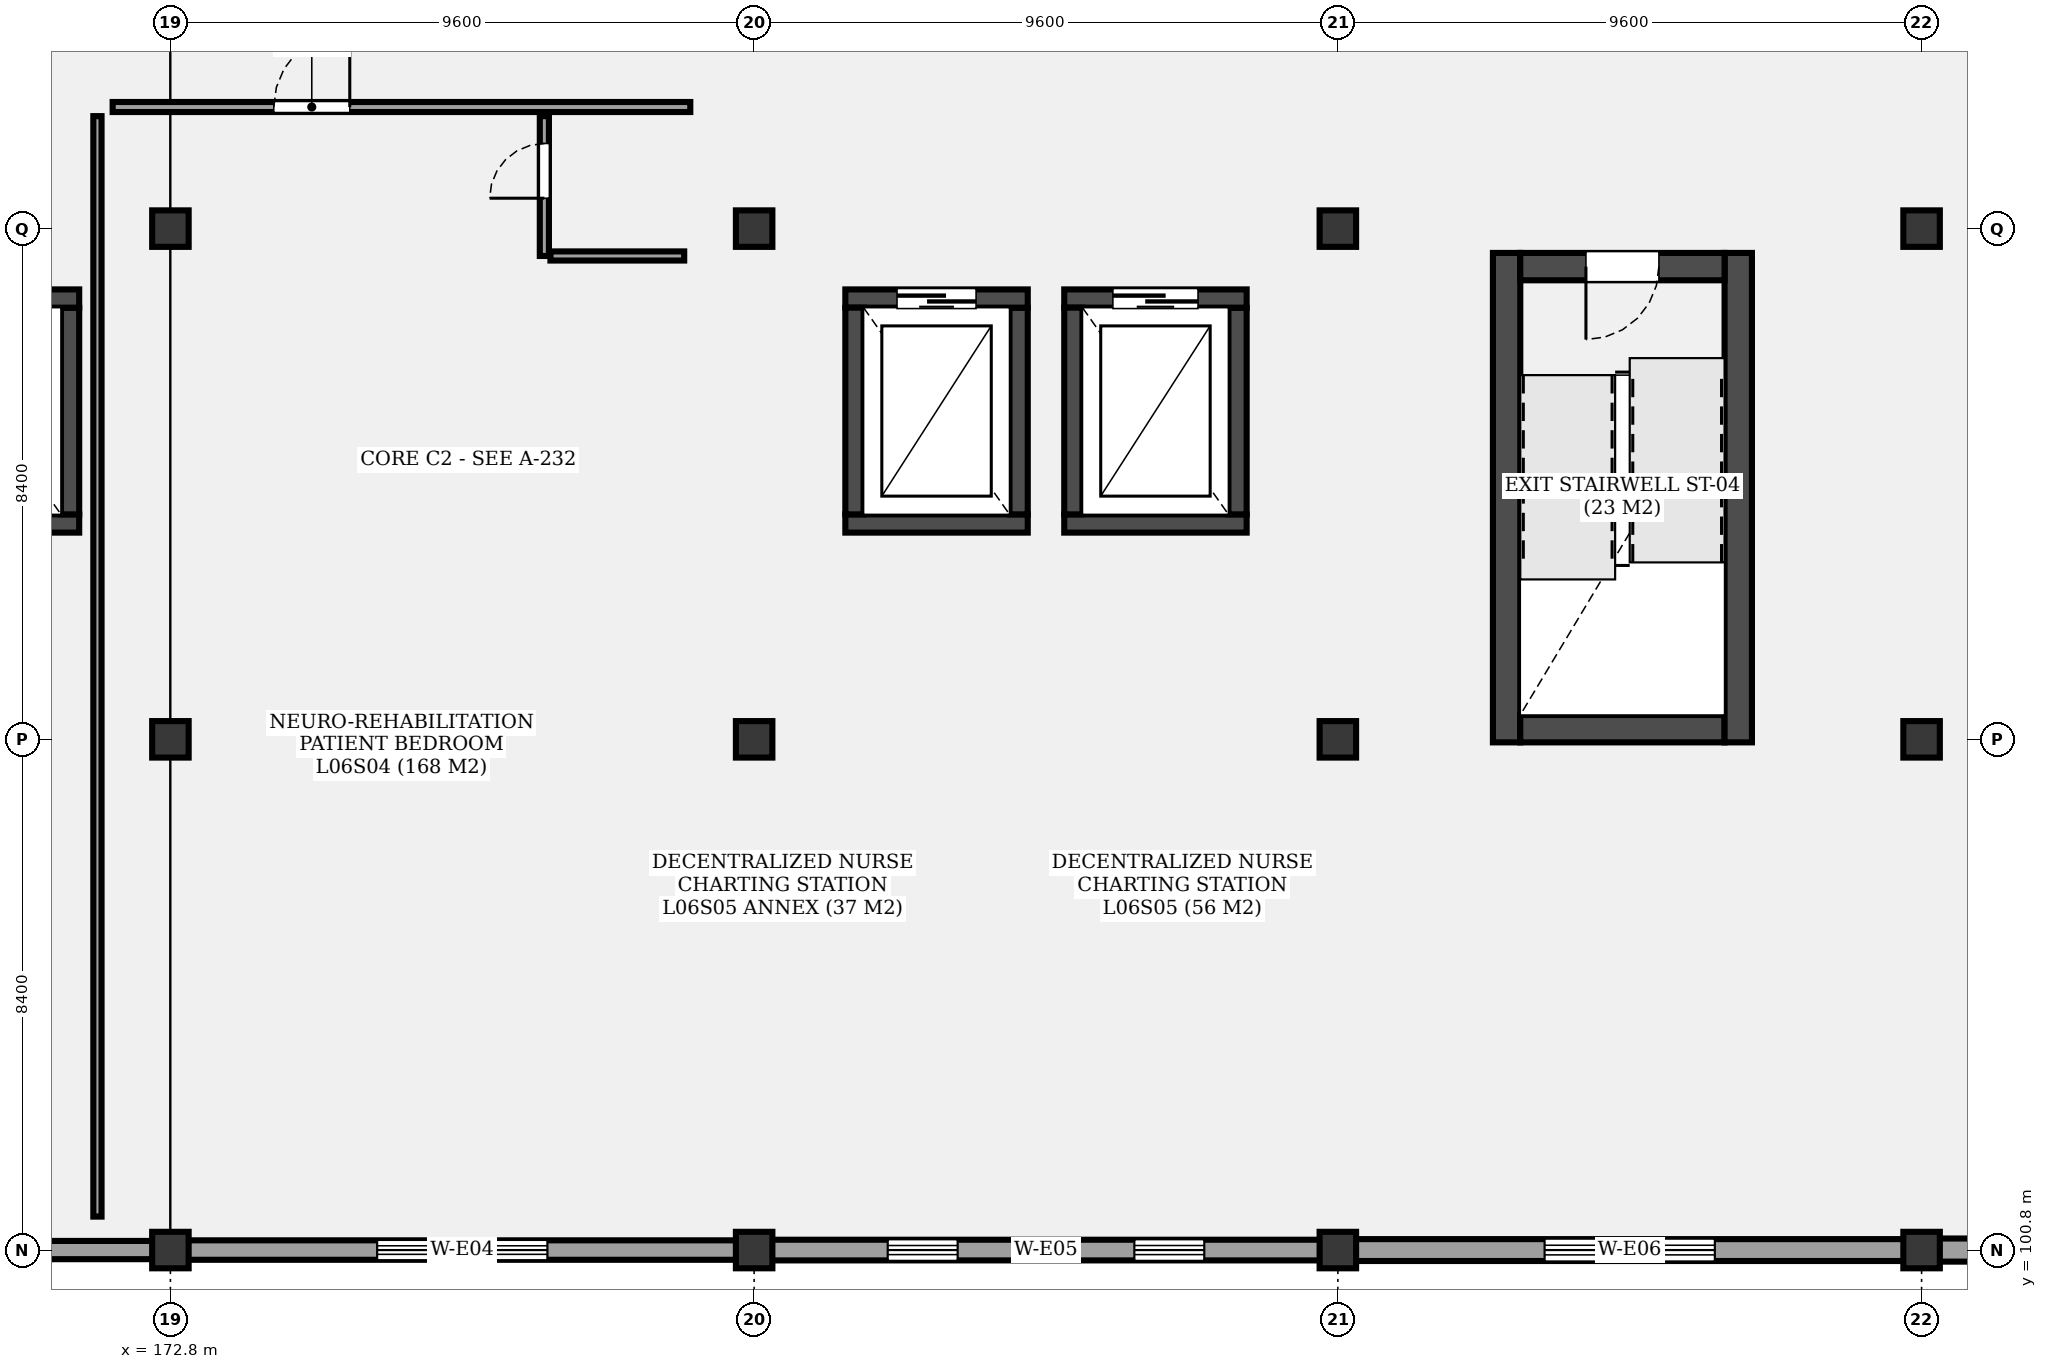
"""IFC4 building model, lengths in metres.
Left out: names, types, materials, properties, quantities, classifications, styles, units other than length and angle.
Written with IfcOpenShell. Run it as: python <this file> out.ifc"""

import sys

from ifc_helpers import new_model, si_unit, direction, frame, frame_2d, origin, origin_2d, place, context, subcontext, project, spatial, rectangle, extrude, element, fill, save


model = new_model("IFC4")
c1 = context("Model", 3, precision=1e-05, world=origin(), true_north=direction((0.0, 1.0)))
c2 = subcontext(c1, "Body", "Model", "MODEL_VIEW")
j1 = project(units=[si_unit("LENGTHUNIT", "METRE"), si_unit("PLANEANGLEUNIT", "RADIAN")], contexts=[c1])
p1 = place(None, origin())
s1 = spatial("IfcSite", under=j1, at=p1, CompositionType="ELEMENT")
p2 = place(p1, origin())
s2 = spatial("IfcBuilding", under=s1, at=p2, CompositionType="ELEMENT")
p3 = place(p2, frame((0.0, 0.0, 26.2)))
s3 = spatial("IfcBuildingStorey", under=s2, at=p3, CompositionType="ELEMENT", Elevation=26.2)
for number, where, z_axis, x_axis in (
    (1, (172.8, 100.8, 0.0), (0.0, 0.0, 1.0), (1.0, 0.0, 0.0)),
    (2, (172.8, 109.2, 0.0), (0.0, 0.0, 1.0), (1.0, 0.0, 0.0)),
    (3, (172.8, 117.6, 0.0), (0.0, 0.0, 1.0), (1.0, 0.0, 0.0)),
    (4, (182.4, 100.8, 0.0), (0.0, 0.0, 1.0), (1.0, 0.0, 0.0)),
    (5, (182.4, 109.2, 0.0), (0.0, 0.0, 1.0), (1.0, 0.0, 0.0)),
    (6, (182.4, 117.6, 0.0), (0.0, 0.0, 1.0), (1.0, 0.0, 0.0)),
    (7, (192.0, 100.8, 0.0), (0.0, 0.0, 1.0), (1.0, 0.0, 0.0)),
    (8, (192.0, 109.2, 0.0), (0.0, 0.0, 1.0), (1.0, 0.0, 0.0)),
    (9, (192.0, 117.6, 0.0), (0.0, 0.0, 1.0), (1.0, 0.0, 0.0)),
    (10, (201.6, 100.8, 0.0), (0.0, 0.0, 1.0), (1.0, 0.0, 0.0)),
    (11, (201.6, 109.2, 0.0), (0.0, 0.0, 1.0), (1.0, 0.0, 0.0)),
    (12, (201.6, 117.6, 0.0), (0.0, 0.0, 1.0), (1.0, 0.0, 0.0)),
):
    element("IfcColumn", number, at=place(p3, frame(where, z_axis=z_axis, x_axis=x_axis)), inside=s3, PredefinedType="COLUMN", context=c2, shape_type="SweptSolid", body=[
        extrude(rectangle(XDim=0.6, YDim=0.6, at=origin_2d()), origin(), (0.0, 0.0, 1.0), 4.2),
    ])
p4 = place(p3, frame((194.775, 117.2, 0.0), z_axis=(0.0, 0.0, 1.0), x_axis=(0.0, -1.0, 0.0)))
e13 = element("IfcWall", 13, at=p4, inside=s3, PredefinedType="SHEAR", context=c2, shape_type="SweptSolid", body=[
    extrude(rectangle(XDim=8.05, YDim=0.45, at=frame_2d((4.025, 0.0))), origin(), (0.0, 0.0, 1.0), 4.2),
])
p5 = place(p3, frame((195.0, 109.375, 0.0), z_axis=(0.0, 0.0, 1.0), x_axis=(1.0, 0.0, 0.0)))
e14 = element("IfcWall", 14, at=p5, inside=s3, PredefinedType="SHEAR", context=c2, shape_type="SweptSolid", body=[
    extrude(rectangle(XDim=3.36, YDim=0.45, at=frame_2d((1.68, 0.0))), origin(), (0.0, 0.0, 1.0), 4.2),
])
p6 = place(p3, frame((198.585, 109.15, 0.0), z_axis=(0.0, 0.0, 1.0), x_axis=(0.0, 1.0, 0.0)))
e15 = element("IfcWall", 15, at=p6, inside=s3, PredefinedType="SHEAR", context=c2, shape_type="SweptSolid", body=[
    extrude(rectangle(XDim=8.05, YDim=0.45, at=frame_2d((4.025, 0.0))), origin(), (0.0, 0.0, 1.0), 4.2),
])
p7 = place(p3, frame((198.36, 116.975, 0.0), z_axis=(0.0, 0.0, 1.0), x_axis=(-1.0, 0.0, 0.0)))
e16 = element("IfcWall", 16, at=p7, inside=s3, PredefinedType="SHEAR", context=c2, shape_type="SweptSolid", body=[
    extrude(rectangle(XDim=3.36, YDim=0.45, at=frame_2d((1.68, 0.0))), origin(), (0.0, 0.0, 1.0), 4.2),
])
p8 = place(p7, frame((1.08, 0.0, 0.0)))
e17 = element("IfcOpeningElement", 17, at=p8, cuts=e16, PredefinedType="OPENING", context=c2, shape_type="SweptSolid", body=[
    extrude(rectangle(XDim=1.2, YDim=2.2, at=frame_2d((0.6, 1.1))), frame((0.0, 0.235, 0.0), z_axis=(0.0, -1.0, 0.0), x_axis=(1.0, 0.0, 0.0)), (0.0, 0.0, 1.0), 0.47),
])
p9 = place(p3, frame((168.3, 112.75, 0.0), z_axis=(0.0, 0.0, 1.0), x_axis=(1.0, 0.0, 0.0)))
e18 = element("IfcWall", 18, at=p9, inside=s3, PredefinedType="SHEAR", context=c2, shape_type="SweptSolid", body=[
    extrude(rectangle(XDim=3.0, YDim=0.3, at=frame_2d((1.5, 0.0))), origin(), (0.0, 0.0, 1.0), 4.2),
])
p10 = place(p3, frame((171.15, 112.9, 0.0), z_axis=(0.0, 0.0, 1.0), x_axis=(0.0, 1.0, 0.0)))
e19 = element("IfcWall", 19, at=p10, inside=s3, PredefinedType="SHEAR", context=c2, shape_type="SweptSolid", body=[
    extrude(rectangle(XDim=3.4, YDim=0.3, at=frame_2d((1.7, 0.0))), origin(), (0.0, 0.0, 1.0), 4.2),
])
p11 = place(p3, frame((171.3, 116.45, 0.0), z_axis=(0.0, 0.0, 1.0), x_axis=(-1.0, 0.0, 0.0)))
e20 = element("IfcWall", 20, at=p11, inside=s3, PredefinedType="SHEAR", context=c2, shape_type="SweptSolid", body=[
    extrude(rectangle(XDim=3.0, YDim=0.3, at=frame_2d((1.5, 0.0))), origin(), (0.0, 0.0, 1.0), 4.2),
])
p12 = place(p11, frame((0.8, 0.0, 0.0)))
e21 = element("IfcOpeningElement", 21, at=p12, cuts=e20, PredefinedType="OPENING", context=c2, shape_type="SweptSolid", body=[
    extrude(rectangle(XDim=1.4, YDim=2.3, at=frame_2d((0.7, 1.15))), frame((0.0, 0.16, 0.0), z_axis=(0.0, -1.0, 0.0), x_axis=(1.0, 0.0, 0.0)), (0.0, 0.0, 1.0), 0.32),
])
p13 = place(p3, frame((183.9, 112.75, 0.0), z_axis=(0.0, 0.0, 1.0), x_axis=(1.0, 0.0, 0.0)))
e22 = element("IfcWall", 22, at=p13, inside=s3, PredefinedType="SHEAR", context=c2, shape_type="SweptSolid", body=[
    extrude(rectangle(XDim=3.0, YDim=0.3, at=frame_2d((1.5, 0.0))), origin(), (0.0, 0.0, 1.0), 4.2),
])
p14 = place(p3, frame((186.75, 112.9, 0.0), z_axis=(0.0, 0.0, 1.0), x_axis=(0.0, 1.0, 0.0)))
e23 = element("IfcWall", 23, at=p14, inside=s3, PredefinedType="SHEAR", context=c2, shape_type="SweptSolid", body=[
    extrude(rectangle(XDim=3.4, YDim=0.3, at=frame_2d((1.7, 0.0))), origin(), (0.0, 0.0, 1.0), 4.2),
])
p15 = place(p3, frame((186.9, 116.45, 0.0), z_axis=(0.0, 0.0, 1.0), x_axis=(-1.0, 0.0, 0.0)))
e24 = element("IfcWall", 24, at=p15, inside=s3, PredefinedType="SHEAR", context=c2, shape_type="SweptSolid", body=[
    extrude(rectangle(XDim=3.0, YDim=0.3, at=frame_2d((1.5, 0.0))), origin(), (0.0, 0.0, 1.0), 4.2),
])
p16 = place(p15, frame((0.85, 0.0, 0.0)))
e25 = element("IfcOpeningElement", 25, at=p16, cuts=e24, PredefinedType="OPENING", context=c2, shape_type="SweptSolid", body=[
    extrude(rectangle(XDim=1.3, YDim=2.3, at=frame_2d((0.65, 1.15))), frame((0.0, 0.16, 0.0), z_axis=(0.0, -1.0, 0.0), x_axis=(1.0, 0.0, 0.0)), (0.0, 0.0, 1.0), 0.32),
])
p17 = place(p3, frame((184.05, 116.3, 0.0), z_axis=(0.0, 0.0, 1.0), x_axis=(0.0, -1.0, 0.0)))
e26 = element("IfcWall", 26, at=p17, inside=s3, PredefinedType="SHEAR", context=c2, shape_type="SweptSolid", body=[
    extrude(rectangle(XDim=3.4, YDim=0.3, at=frame_2d((1.7, 0.0))), origin(), (0.0, 0.0, 1.0), 4.2),
])
p18 = place(p3, frame((187.5, 112.75, 0.0), z_axis=(0.0, 0.0, 1.0), x_axis=(1.0, 0.0, 0.0)))
e27 = element("IfcWall", 27, at=p18, inside=s3, PredefinedType="SHEAR", context=c2, shape_type="SweptSolid", body=[
    extrude(rectangle(XDim=3.0, YDim=0.3, at=frame_2d((1.5, 0.0))), origin(), (0.0, 0.0, 1.0), 4.2),
])
p19 = place(p3, frame((190.35, 112.9, 0.0), z_axis=(0.0, 0.0, 1.0), x_axis=(0.0, 1.0, 0.0)))
e28 = element("IfcWall", 28, at=p19, inside=s3, PredefinedType="SHEAR", context=c2, shape_type="SweptSolid", body=[
    extrude(rectangle(XDim=3.4, YDim=0.3, at=frame_2d((1.7, 0.0))), origin(), (0.0, 0.0, 1.0), 4.2),
])
p20 = place(p3, frame((190.5, 116.45, 0.0), z_axis=(0.0, 0.0, 1.0), x_axis=(-1.0, 0.0, 0.0)))
e29 = element("IfcWall", 29, at=p20, inside=s3, PredefinedType="SHEAR", context=c2, shape_type="SweptSolid", body=[
    extrude(rectangle(XDim=3.0, YDim=0.3, at=frame_2d((1.5, 0.0))), origin(), (0.0, 0.0, 1.0), 4.2),
])
p21 = place(p20, frame((0.8, 0.0, 0.0)))
e30 = element("IfcOpeningElement", 30, at=p21, cuts=e29, PredefinedType="OPENING", context=c2, shape_type="SweptSolid", body=[
    extrude(rectangle(XDim=1.4, YDim=2.3, at=frame_2d((0.7, 1.15))), frame((0.0, 0.16, 0.0), z_axis=(0.0, -1.0, 0.0), x_axis=(1.0, 0.0, 0.0)), (0.0, 0.0, 1.0), 0.32),
])
p22 = place(p3, frame((187.65, 116.3, 0.0), z_axis=(0.0, 0.0, 1.0), x_axis=(0.0, -1.0, 0.0)))
e31 = element("IfcWall", 31, at=p22, inside=s3, PredefinedType="SHEAR", context=c2, shape_type="SweptSolid", body=[
    extrude(rectangle(XDim=3.4, YDim=0.3, at=frame_2d((1.7, 0.0))), origin(), (0.0, 0.0, 1.0), 4.2),
])
p23 = place(p3, frame((172.8, 100.8, 0.0), z_axis=(0.0, 0.0, 1.0), x_axis=(-1.0, 0.0, 0.0)))
e32 = element("IfcWall", 32, at=p23, inside=s3, PredefinedType="SOLIDWALL", context=c2, shape_type="SweptSolid", body=[
    extrude(rectangle(XDim=19.2, YDim=0.3, at=frame_2d((9.6, 0.0))), origin(), (0.0, 0.0, 1.0), 3.39),
])
p24 = place(p23, frame((4.693, 0.0, 0.85)))
e33 = element("IfcOpeningElement", 33, at=p24, cuts=e32, PredefinedType="OPENING", context=c2, shape_type="SweptSolid", body=[
    extrude(rectangle(XDim=1.15, YDim=1.6, at=frame_2d((0.575, 0.8))), frame((0.0, 0.16, 0.0), z_axis=(0.0, -1.0, 0.0), x_axis=(1.0, 0.0, 0.0)), (0.0, 0.0, 1.0), 0.32),
])
p25 = place(p23, frame((13.357, 0.0, 0.85)))
e34 = element("IfcOpeningElement", 34, at=p25, cuts=e32, PredefinedType="OPENING", context=c2, shape_type="SweptSolid", body=[
    extrude(rectangle(XDim=1.15, YDim=1.6, at=frame_2d((0.575, 0.8))), frame((0.0, 0.16, 0.0), z_axis=(0.0, -1.0, 0.0), x_axis=(1.0, 0.0, 0.0)), (0.0, 0.0, 1.0), 0.32),
])
p26 = place(p3, frame((182.4, 100.8, 0.0), z_axis=(0.0, 0.0, 1.0), x_axis=(-1.0, 0.0, 0.0)))
e35 = element("IfcWall", 35, at=p26, inside=s3, PredefinedType="SOLIDWALL", context=c2, shape_type="SweptSolid", body=[
    extrude(rectangle(XDim=9.6, YDim=0.32, at=frame_2d((4.8, 0.0))), origin(), (0.0, 0.0, 1.0), 3.39),
])
p27 = place(p26, frame((3.4, 0.0, 0.85)))
e36 = element("IfcOpeningElement", 36, at=p27, cuts=e35, PredefinedType="OPENING", context=c2, shape_type="SweptSolid", body=[
    extrude(rectangle(XDim=2.8, YDim=1.4, at=frame_2d((1.4, 0.7))), frame((0.0, 0.17, 0.0), z_axis=(0.0, -1.0, 0.0), x_axis=(1.0, 0.0, 0.0)), (0.0, 0.0, 1.0), 0.34),
])
p28 = place(p3, frame((192.0, 100.8, 0.0), z_axis=(0.0, 0.0, 1.0), x_axis=(-1.0, 0.0, 0.0)))
e37 = element("IfcWall", 37, at=p28, inside=s3, PredefinedType="SOLIDWALL", context=c2, shape_type="SweptSolid", body=[
    extrude(rectangle(XDim=9.6, YDim=0.34, at=frame_2d((4.8, 0.0))), origin(), (0.0, 0.0, 1.0), 3.39),
])
p29 = place(p28, frame((2.197, 0.0, 0.85)))
e38 = element("IfcOpeningElement", 38, at=p29, cuts=e37, PredefinedType="OPENING", context=c2, shape_type="SweptSolid", body=[
    extrude(rectangle(XDim=1.15, YDim=1.6, at=frame_2d((0.575, 0.8))), frame((0.0, 0.18, 0.0), z_axis=(0.0, -1.0, 0.0), x_axis=(1.0, 0.0, 0.0)), (0.0, 0.0, 1.0), 0.36),
])
p30 = place(p28, frame((6.253, 0.0, 0.85)))
e39 = element("IfcOpeningElement", 39, at=p30, cuts=e37, PredefinedType="OPENING", context=c2, shape_type="SweptSolid", body=[
    extrude(rectangle(XDim=1.15, YDim=1.6, at=frame_2d((0.575, 0.8))), frame((0.0, 0.18, 0.0), z_axis=(0.0, -1.0, 0.0), x_axis=(1.0, 0.0, 0.0)), (0.0, 0.0, 1.0), 0.36),
])
p31 = place(p3, frame((201.6, 100.8, 0.0), z_axis=(0.0, 0.0, 1.0), x_axis=(-1.0, 0.0, 0.0)))
e40 = element("IfcWall", 40, at=p31, inside=s3, PredefinedType="SOLIDWALL", context=c2, shape_type="SweptSolid", body=[
    extrude(rectangle(XDim=9.6, YDim=0.36, at=frame_2d((4.8, 0.0))), origin(), (0.0, 0.0, 1.0), 3.39),
])
p32 = place(p31, frame((3.4, 0.0, 0.85)))
e41 = element("IfcOpeningElement", 41, at=p32, cuts=e40, PredefinedType="OPENING", context=c2, shape_type="SweptSolid", body=[
    extrude(rectangle(XDim=2.8, YDim=1.4, at=frame_2d((1.4, 0.7))), frame((0.0, 0.19, 0.0), z_axis=(0.0, -1.0, 0.0), x_axis=(1.0, 0.0, 0.0)), (0.0, 0.0, 1.0), 0.38),
])
p33 = place(p3, frame((211.2, 100.8, 0.0), z_axis=(0.0, 0.0, 1.0), x_axis=(-1.0, 0.0, 0.0)))
e42 = element("IfcWall", 42, at=p33, inside=s3, PredefinedType="SOLIDWALL", context=c2, shape_type="SweptSolid", body=[
    extrude(rectangle(XDim=9.6, YDim=0.38, at=frame_2d((4.8, 0.0))), origin(), (0.0, 0.0, 1.0), 3.39),
])
p34 = place(p33, frame((2.197, 0.0, 0.85)))
e43 = element("IfcOpeningElement", 43, at=p34, cuts=e42, PredefinedType="OPENING", context=c2, shape_type="SweptSolid", body=[
    extrude(rectangle(XDim=1.15, YDim=1.6, at=frame_2d((0.575, 0.8))), frame((0.0, 0.2, 0.0), z_axis=(0.0, -1.0, 0.0), x_axis=(1.0, 0.0, 0.0)), (0.0, 0.0, 1.0), 0.4),
])
p35 = place(p33, frame((6.253, 0.0, 0.85)))
e44 = element("IfcOpeningElement", 44, at=p35, cuts=e42, PredefinedType="OPENING", context=c2, shape_type="SweptSolid", body=[
    extrude(rectangle(XDim=1.15, YDim=1.6, at=frame_2d((0.575, 0.8))), frame((0.0, 0.2, 0.0), z_axis=(0.0, -1.0, 0.0), x_axis=(1.0, 0.0, 0.0)), (0.0, 0.0, 1.0), 0.4),
])
p36 = place(p3, frame((171.85, 119.6, 0.0), z_axis=(0.0, 0.0, 1.0), x_axis=(1.0, 0.0, 0.0)))
e45 = element("IfcWall", 45, at=p36, inside=s3, PredefinedType="PARTITIONING", context=c2, shape_type="SweptSolid", body=[
    extrude(rectangle(XDim=9.5, YDim=0.165, at=frame_2d((4.75, 0.0))), origin(), (0.0, 0.0, 1.0), 3.3),
])
p37 = place(p36, frame((2.65, 0.0, 0.0)))
e46 = element("IfcOpeningElement", 46, at=p37, cuts=e45, PredefinedType="OPENING", context=c2, shape_type="SweptSolid", body=[
    extrude(rectangle(XDim=1.25, YDim=2.2, at=frame_2d((0.625, 1.1))), frame((0.0, 0.093, 0.0), z_axis=(0.0, -1.0, 0.0), x_axis=(1.0, 0.0, 0.0)), (0.0, 0.0, 1.0), 0.185),
])
p38 = place(p3, frame((178.95, 117.15, 0.0), z_axis=(0.0, 0.0, 1.0), x_axis=(0.0, 1.0, 0.0)))
e47 = element("IfcWall", 47, at=p38, inside=s3, PredefinedType="PARTITIONING", context=c2, shape_type="SweptSolid", body=[
    extrude(rectangle(XDim=2.3, YDim=0.15, at=frame_2d((1.15, 0.0))), origin(), (0.0, 0.0, 1.0), 3.3),
])
p39 = place(p38, frame((0.95, 0.0, 0.0)))
e48 = element("IfcOpeningElement", 48, at=p39, cuts=e47, PredefinedType="OPENING", context=c2, shape_type="SweptSolid", body=[
    extrude(rectangle(XDim=0.9, YDim=2.1, at=frame_2d((0.45, 1.05))), frame((0.0, 0.085, 0.0), z_axis=(0.0, -1.0, 0.0), x_axis=(1.0, 0.0, 0.0)), (0.0, 0.0, 1.0), 0.17),
])
p40 = place(p3, frame((179.05, 117.15, 0.0), z_axis=(0.0, 0.0, 1.0), x_axis=(1.0, 0.0, 0.0)))
e49 = element("IfcWall", 49, at=p40, inside=s3, PredefinedType="PARTITIONING", context=c2, shape_type="SweptSolid", body=[
    extrude(rectangle(XDim=2.2, YDim=0.15, at=frame_2d((1.1, 0.0))), origin(), (0.0, 0.0, 1.0), 3.3),
])
p41 = place(p3, frame((171.6, 101.35, 0.0), z_axis=(0.0, 0.0, 1.0), x_axis=(0.0, 1.0, 0.0)))
e50 = element("IfcWall", 50, at=p41, inside=s3, PredefinedType="PARTITIONING", context=c2, shape_type="SweptSolid", body=[
    extrude(rectangle(XDim=18.1, YDim=0.135, at=frame_2d((9.05, 0.0))), origin(), (0.0, 0.0, 1.0), 3.3),
])
p42 = place(p8, origin())
e51 = element("IfcDoor", 51, at=p42, inside=s3, OperationType="SINGLE_SWING_RIGHT", PredefinedType="DOOR", context=c2, shape_type="SweptSolid", body=[
    extrude(rectangle(XDim=1.2, YDim=2.2, at=frame_2d((0.6, 1.1))), frame((0.0, 0.025, 0.0), z_axis=(0.0, -1.0, 0.0), x_axis=(1.0, 0.0, 0.0)), (0.0, 0.0, 1.0), 0.05),
])
fill(e17, e51)
p43 = place(p16, origin())
e52 = element("IfcDoor", 52, at=p43, inside=s3, OperationType="SLIDING_TO_LEFT", PredefinedType="DOOR", context=c2, shape_type="SweptSolid", body=[
    extrude(rectangle(XDim=1.3, YDim=2.3, at=frame_2d((0.65, 1.15))), frame((0.0, 0.025, 0.0), z_axis=(0.0, -1.0, 0.0), x_axis=(1.0, 0.0, 0.0)), (0.0, 0.0, 1.0), 0.05),
])
fill(e25, e52)
p44 = place(p21, origin())
e53 = element("IfcDoor", 53, at=p44, inside=s3, OperationType="SLIDING_TO_LEFT", PredefinedType="DOOR", context=c2, shape_type="SweptSolid", body=[
    extrude(rectangle(XDim=1.4, YDim=2.3, at=frame_2d((0.7, 1.15))), frame((0.0, 0.025, 0.0), z_axis=(0.0, -1.0, 0.0), x_axis=(1.0, 0.0, 0.0)), (0.0, 0.0, 1.0), 0.05),
])
fill(e30, e53)
p45 = place(p27, origin())
e54 = element("IfcWindow", 54, at=p45, inside=s3, PartitioningType="SINGLE_PANEL", PredefinedType="WINDOW", context=c2, shape_type="SweptSolid", body=[
    extrude(rectangle(XDim=2.8, YDim=1.4, at=frame_2d((1.4, 0.7))), frame((0.0, 0.03, 0.0), z_axis=(0.0, -1.0, 0.0), x_axis=(1.0, 0.0, 0.0)), (0.0, 0.0, 1.0), 0.06),
])
fill(e36, e54)
p46 = place(p29, origin())
e55 = element("IfcWindow", 55, at=p46, inside=s3, PartitioningType="SINGLE_PANEL", PredefinedType="WINDOW", context=c2, shape_type="SweptSolid", body=[
    extrude(rectangle(XDim=1.15, YDim=1.6, at=frame_2d((0.575, 0.8))), frame((0.0, 0.03, 0.0), z_axis=(0.0, -1.0, 0.0), x_axis=(1.0, 0.0, 0.0)), (0.0, 0.0, 1.0), 0.06),
])
fill(e38, e55)
p47 = place(p30, origin())
e56 = element("IfcWindow", 56, at=p47, inside=s3, PartitioningType="SINGLE_PANEL", PredefinedType="WINDOW", context=c2, shape_type="SweptSolid", body=[
    extrude(rectangle(XDim=1.15, YDim=1.6, at=frame_2d((0.575, 0.8))), frame((0.0, 0.03, 0.0), z_axis=(0.0, -1.0, 0.0), x_axis=(1.0, 0.0, 0.0)), (0.0, 0.0, 1.0), 0.06),
])
fill(e39, e56)
p48 = place(p32, origin())
e57 = element("IfcWindow", 57, at=p48, inside=s3, PartitioningType="SINGLE_PANEL", PredefinedType="WINDOW", context=c2, shape_type="SweptSolid", body=[
    extrude(rectangle(XDim=2.8, YDim=1.4, at=frame_2d((1.4, 0.7))), frame((0.0, 0.03, 0.0), z_axis=(0.0, -1.0, 0.0), x_axis=(1.0, 0.0, 0.0)), (0.0, 0.0, 1.0), 0.06),
])
fill(e41, e57)
p49 = place(p37, origin())
e58 = element("IfcDoor", 58, at=p49, inside=s3, OperationType="SINGLE_SWING_RIGHT", PredefinedType="DOOR", context=c2, shape_type="SweptSolid", body=[
    extrude(rectangle(XDim=1.25, YDim=2.2, at=frame_2d((0.625, 1.1))), frame((0.0, 0.025, 0.0), z_axis=(0.0, -1.0, 0.0), x_axis=(1.0, 0.0, 0.0)), (0.0, 0.0, 1.0), 0.05),
])
fill(e46, e58)
p50 = place(p39, origin())
e59 = element("IfcDoor", 59, at=p50, inside=s3, OperationType="SINGLE_SWING_LEFT", PredefinedType="DOOR", context=c2, shape_type="SweptSolid", body=[
    extrude(rectangle(XDim=0.9, YDim=2.1, at=frame_2d((0.45, 1.05))), frame((0.0, 0.025, 0.0), z_axis=(0.0, -1.0, 0.0), x_axis=(1.0, 0.0, 0.0)), (0.0, 0.0, 1.0), 0.05),
])
fill(e48, e59)
save(model, sys.argv[1])
